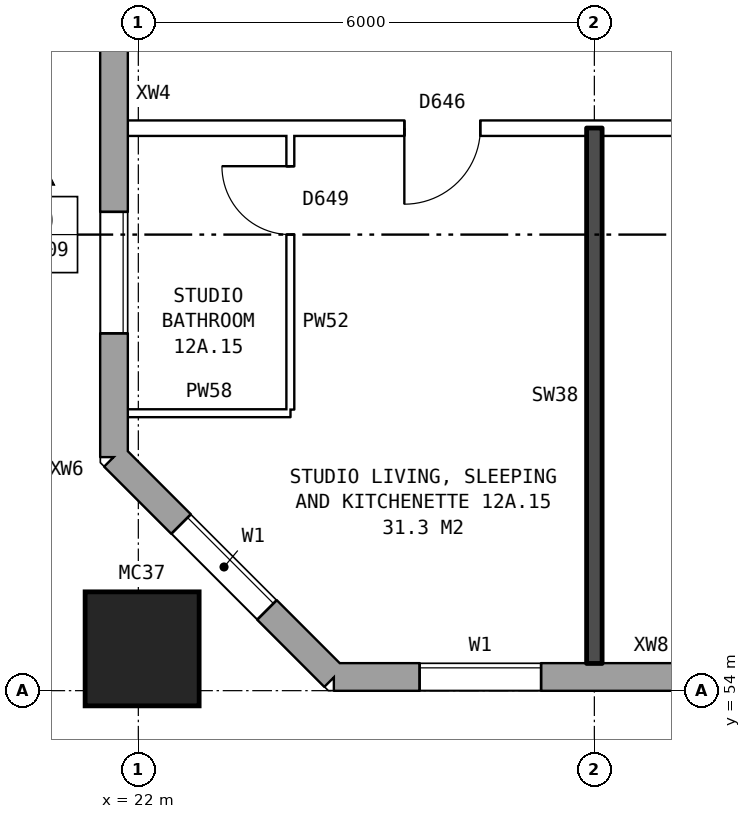
"""IFC4 building model, lengths in metres.
Left out: names, types, materials, properties, quantities, classifications, styles, units other than length and angle.
Written with IfcOpenShell. Run it as: python <this file> out.ifc"""

import sys

from ifc_helpers import new_model, si_unit, direction, frame, frame_2d, origin, origin_2d, place, context, subcontext, project, spatial, rectangle, hollow_rectangle, extrude, element, fill, save


model = new_model("IFC4")
c1 = context("Model", 3, precision=1e-05, world=origin(), true_north=direction((0.0, 1.0)))
c2 = subcontext(c1, "Body", "Model", "MODEL_VIEW")
j1 = project(units=[si_unit("LENGTHUNIT", "METRE"), si_unit("PLANEANGLEUNIT", "RADIAN")], contexts=[c1])
p1 = place(None, origin())
s1 = spatial("IfcSite", under=j1, at=p1, CompositionType="ELEMENT")
p2 = place(p1, origin())
s2 = spatial("IfcBuilding", under=s1, at=p2, CompositionType="ELEMENT")
p3 = place(p2, frame((0.0, 0.0, 47.4)))
s3 = spatial("IfcBuildingStorey", under=s2, at=p3, CompositionType="ELEMENT", Elevation=47.4)
p4 = place(p3, frame((22.05, 54.55, 0.0), z_axis=(0.0, 0.0, 1.0), x_axis=(1.0, 0.0, 0.0)))
e1 = element("IfcColumn", 1, at=p4, inside=s3, PredefinedType="COLUMN", context=c2, shape_type="SweptSolid", body=[
    extrude(hollow_rectangle(XDim=1.5, YDim=1.5, WallThickness=0.08, at=origin_2d()), origin(), (0.0, 0.0, 1.0), 3.1),
])
p5 = place(p3, frame((21.68, 57.075, 0.0), z_axis=(0.0, 0.0, 1.0), x_axis=(0.707106781187, -0.707106781187, 0.0)))
e2 = element("IfcWall", 2, at=p5, inside=s3, PredefinedType="STANDARD", context=c2, shape_type="SweptSolid", body=[
    extrude(rectangle(XDim=4.094, YDim=0.36, at=frame_2d((2.047, 0.0))), origin(), (0.0, 0.0, 1.0), 2.85),
])
p6 = place(p5, frame((1.247, 0.0, 0.8)))
e3 = element("IfcOpeningElement", 3, at=p6, cuts=e2, PredefinedType="OPENING", context=c2, shape_type="SweptSolid", body=[
    extrude(rectangle(XDim=1.6, YDim=1.8, at=frame_2d((0.8, 0.9))), frame((0.0, 0.19, 0.0), z_axis=(0.0, -1.0, 0.0), x_axis=(1.0, 0.0, 0.0)), (0.0, 0.0, 1.0), 0.38),
])
p7 = place(p3, frame((24.575, 54.18, 0.0), z_axis=(0.0, 0.0, 1.0), x_axis=(1.0, 0.0, 0.0)))
e4 = element("IfcWall", 4, at=p7, inside=s3, PredefinedType="STANDARD", context=c2, shape_type="SweptSolid", body=[
    extrude(rectangle(XDim=48.351, YDim=0.36, at=frame_2d((24.175, 0.0))), origin(), (0.0, 0.0, 1.0), 2.85),
])
p8 = place(p7, frame((1.125, 0.0, 0.8)))
e5 = element("IfcOpeningElement", 5, at=p8, cuts=e4, PredefinedType="OPENING", context=c2, shape_type="SweptSolid", body=[
    extrude(rectangle(XDim=1.6, YDim=1.8, at=frame_2d((0.8, 0.9))), frame((0.0, 0.19, 0.0), z_axis=(0.0, -1.0, 0.0), x_axis=(1.0, 0.0, 0.0)), (0.0, 0.0, 1.0), 0.38),
])
p9 = place(p7, frame((5.625, 0.0, 0.8)))
e6 = element("IfcOpeningElement", 6, at=p9, cuts=e4, PredefinedType="OPENING", context=c2, shape_type="SweptSolid", body=[
    extrude(rectangle(XDim=1.2, YDim=1.2, at=frame_2d((0.6, 0.6))), frame((0.0, 0.19, 0.0), z_axis=(0.0, -1.0, 0.0), x_axis=(1.0, 0.0, 0.0)), (0.0, 0.0, 1.0), 0.38),
])
p10 = place(p7, frame((7.125, 0.0, 0.8)))
e7 = element("IfcOpeningElement", 7, at=p10, cuts=e4, PredefinedType="OPENING", context=c2, shape_type="SweptSolid", body=[
    extrude(rectangle(XDim=1.6, YDim=1.8, at=frame_2d((0.8, 0.9))), frame((0.0, 0.19, 0.0), z_axis=(0.0, -1.0, 0.0), x_axis=(1.0, 0.0, 0.0)), (0.0, 0.0, 1.0), 0.38),
])
p11 = place(p7, frame((10.125, 0.0, 0.8)))
e8 = element("IfcOpeningElement", 8, at=p11, cuts=e4, PredefinedType="OPENING", context=c2, shape_type="SweptSolid", body=[
    extrude(rectangle(XDim=1.6, YDim=1.8, at=frame_2d((0.8, 0.9))), frame((0.0, 0.19, 0.0), z_axis=(0.0, -1.0, 0.0), x_axis=(1.0, 0.0, 0.0)), (0.0, 0.0, 1.0), 0.38),
])
p12 = place(p7, frame((13.125, 0.0, 0.8)))
e9 = element("IfcOpeningElement", 9, at=p12, cuts=e4, PredefinedType="OPENING", context=c2, shape_type="SweptSolid", body=[
    extrude(rectangle(XDim=1.6, YDim=1.8, at=frame_2d((0.8, 0.9))), frame((0.0, 0.19, 0.0), z_axis=(0.0, -1.0, 0.0), x_axis=(1.0, 0.0, 0.0)), (0.0, 0.0, 1.0), 0.38),
])
p13 = place(p7, frame((16.125, 0.0, 0.8)))
e10 = element("IfcOpeningElement", 10, at=p13, cuts=e4, PredefinedType="OPENING", context=c2, shape_type="SweptSolid", body=[
    extrude(rectangle(XDim=1.6, YDim=1.8, at=frame_2d((0.8, 0.9))), frame((0.0, 0.19, 0.0), z_axis=(0.0, -1.0, 0.0), x_axis=(1.0, 0.0, 0.0)), (0.0, 0.0, 1.0), 0.38),
])
p14 = place(p7, frame((19.125, 0.0, 0.8)))
e11 = element("IfcOpeningElement", 11, at=p14, cuts=e4, PredefinedType="OPENING", context=c2, shape_type="SweptSolid", body=[
    extrude(rectangle(XDim=1.6, YDim=1.8, at=frame_2d((0.8, 0.9))), frame((0.0, 0.19, 0.0), z_axis=(0.0, -1.0, 0.0), x_axis=(1.0, 0.0, 0.0)), (0.0, 0.0, 1.0), 0.38),
])
p15 = place(p7, frame((22.125, 0.0, 0.8)))
e12 = element("IfcOpeningElement", 12, at=p15, cuts=e4, PredefinedType="OPENING", context=c2, shape_type="SweptSolid", body=[
    extrude(rectangle(XDim=1.6, YDim=1.8, at=frame_2d((0.8, 0.9))), frame((0.0, 0.19, 0.0), z_axis=(0.0, -1.0, 0.0), x_axis=(1.0, 0.0, 0.0)), (0.0, 0.0, 1.0), 0.38),
])
p16 = place(p7, frame((25.125, 0.0, 0.8)))
e13 = element("IfcOpeningElement", 13, at=p16, cuts=e4, PredefinedType="OPENING", context=c2, shape_type="SweptSolid", body=[
    extrude(rectangle(XDim=1.6, YDim=1.8, at=frame_2d((0.8, 0.9))), frame((0.0, 0.19, 0.0), z_axis=(0.0, -1.0, 0.0), x_axis=(1.0, 0.0, 0.0)), (0.0, 0.0, 1.0), 0.38),
])
p17 = place(p7, frame((28.125, 0.0, 0.8)))
e14 = element("IfcOpeningElement", 14, at=p17, cuts=e4, PredefinedType="OPENING", context=c2, shape_type="SweptSolid", body=[
    extrude(rectangle(XDim=1.6, YDim=1.8, at=frame_2d((0.8, 0.9))), frame((0.0, 0.19, 0.0), z_axis=(0.0, -1.0, 0.0), x_axis=(1.0, 0.0, 0.0)), (0.0, 0.0, 1.0), 0.38),
])
p18 = place(p7, frame((31.125, 0.0, 0.8)))
e15 = element("IfcOpeningElement", 15, at=p18, cuts=e4, PredefinedType="OPENING", context=c2, shape_type="SweptSolid", body=[
    extrude(rectangle(XDim=1.6, YDim=1.8, at=frame_2d((0.8, 0.9))), frame((0.0, 0.19, 0.0), z_axis=(0.0, -1.0, 0.0), x_axis=(1.0, 0.0, 0.0)), (0.0, 0.0, 1.0), 0.38),
])
p19 = place(p7, frame((34.125, 0.0, 0.8)))
e16 = element("IfcOpeningElement", 16, at=p19, cuts=e4, PredefinedType="OPENING", context=c2, shape_type="SweptSolid", body=[
    extrude(rectangle(XDim=1.6, YDim=1.8, at=frame_2d((0.8, 0.9))), frame((0.0, 0.19, 0.0), z_axis=(0.0, -1.0, 0.0), x_axis=(1.0, 0.0, 0.0)), (0.0, 0.0, 1.0), 0.38),
])
p20 = place(p7, frame((37.125, 0.0, 0.8)))
e17 = element("IfcOpeningElement", 17, at=p20, cuts=e4, PredefinedType="OPENING", context=c2, shape_type="SweptSolid", body=[
    extrude(rectangle(XDim=1.6, YDim=1.8, at=frame_2d((0.8, 0.9))), frame((0.0, 0.19, 0.0), z_axis=(0.0, -1.0, 0.0), x_axis=(1.0, 0.0, 0.0)), (0.0, 0.0, 1.0), 0.38),
])
p21 = place(p7, frame((40.125, 0.0, 0.8)))
e18 = element("IfcOpeningElement", 18, at=p21, cuts=e4, PredefinedType="OPENING", context=c2, shape_type="SweptSolid", body=[
    extrude(rectangle(XDim=1.6, YDim=1.8, at=frame_2d((0.8, 0.9))), frame((0.0, 0.19, 0.0), z_axis=(0.0, -1.0, 0.0), x_axis=(1.0, 0.0, 0.0)), (0.0, 0.0, 1.0), 0.38),
])
p22 = place(p7, frame((42.025, 0.0, 0.8)))
e19 = element("IfcOpeningElement", 19, at=p22, cuts=e4, PredefinedType="OPENING", context=c2, shape_type="SweptSolid", body=[
    extrude(rectangle(XDim=1.0, YDim=0.9, at=frame_2d((0.5, 0.45))), frame((0.0, 0.19, 0.0), z_axis=(0.0, -1.0, 0.0), x_axis=(1.0, 0.0, 0.0)), (0.0, 0.0, 1.0), 0.38),
])
p23 = place(p7, frame((46.125, 0.0, 0.8)))
e20 = element("IfcOpeningElement", 20, at=p23, cuts=e4, PredefinedType="OPENING", context=c2, shape_type="SweptSolid", body=[
    extrude(rectangle(XDim=1.6, YDim=1.8, at=frame_2d((0.8, 0.9))), frame((0.0, 0.19, 0.0), z_axis=(0.0, -1.0, 0.0), x_axis=(1.0, 0.0, 0.0)), (0.0, 0.0, 1.0), 0.38),
])
p24 = place(p7, frame((44.525, 0.0, 1.7)))
e21 = element("IfcOpeningElement", 21, at=p24, cuts=e4, PredefinedType="OPENING", context=c2, shape_type="SweptSolid", body=[
    extrude(rectangle(XDim=0.6, YDim=0.9, at=frame_2d((0.3, 0.45))), frame((0.0, 0.19, 0.0), z_axis=(0.0, -1.0, 0.0), x_axis=(1.0, 0.0, 0.0)), (0.0, 0.0, 1.0), 0.38),
])
p25 = place(p3, frame((21.68, 82.925, 0.0), z_axis=(0.0, 0.0, 1.0), x_axis=(0.0, -1.0, 0.0)))
e22 = element("IfcWall", 22, at=p25, inside=s3, PredefinedType="STANDARD", context=c2, shape_type="SweptSolid", body=[
    extrude(rectangle(XDim=25.851, YDim=0.36, at=frame_2d((12.925, 0.0))), origin(), (0.0, 0.0, 1.0), 2.85),
])
p26 = place(p25, frame((1.625, 0.0, 0.8)))
e23 = element("IfcOpeningElement", 23, at=p26, cuts=e22, PredefinedType="OPENING", context=c2, shape_type="SweptSolid", body=[
    extrude(rectangle(XDim=1.6, YDim=1.8, at=frame_2d((0.8, 0.9))), frame((0.0, 0.19, 0.0), z_axis=(0.0, -1.0, 0.0), x_axis=(1.0, 0.0, 0.0)), (0.0, 0.0, 1.0), 0.38),
])
p27 = place(p25, frame((6.225, 0.0, 0.8)))
e24 = element("IfcOpeningElement", 24, at=p27, cuts=e22, PredefinedType="OPENING", context=c2, shape_type="SweptSolid", body=[
    extrude(rectangle(XDim=1.0, YDim=0.9, at=frame_2d((0.5, 0.45))), frame((0.0, 0.19, 0.0), z_axis=(0.0, -1.0, 0.0), x_axis=(1.0, 0.0, 0.0)), (0.0, 0.0, 1.0), 0.38),
])
p28 = place(p25, frame((7.625, 0.0, 0.8)))
e25 = element("IfcOpeningElement", 25, at=p28, cuts=e22, PredefinedType="OPENING", context=c2, shape_type="SweptSolid", body=[
    extrude(rectangle(XDim=1.6, YDim=1.8, at=frame_2d((0.8, 0.9))), frame((0.0, 0.19, 0.0), z_axis=(0.0, -1.0, 0.0), x_axis=(1.0, 0.0, 0.0)), (0.0, 0.0, 1.0), 0.38),
])
p29 = place(p25, frame((10.625, 0.0, 0.8)))
e26 = element("IfcOpeningElement", 26, at=p29, cuts=e22, PredefinedType="OPENING", context=c2, shape_type="SweptSolid", body=[
    extrude(rectangle(XDim=1.6, YDim=1.8, at=frame_2d((0.8, 0.9))), frame((0.0, 0.19, 0.0), z_axis=(0.0, -1.0, 0.0), x_axis=(1.0, 0.0, 0.0)), (0.0, 0.0, 1.0), 0.38),
])
p30 = place(p25, frame((13.625, 0.0, 0.8)))
e27 = element("IfcOpeningElement", 27, at=p30, cuts=e22, PredefinedType="OPENING", context=c2, shape_type="SweptSolid", body=[
    extrude(rectangle(XDim=1.6, YDim=1.8, at=frame_2d((0.8, 0.9))), frame((0.0, 0.19, 0.0), z_axis=(0.0, -1.0, 0.0), x_axis=(1.0, 0.0, 0.0)), (0.0, 0.0, 1.0), 0.38),
])
p31 = place(p25, frame((16.625, 0.0, 0.8)))
e28 = element("IfcOpeningElement", 28, at=p31, cuts=e22, PredefinedType="OPENING", context=c2, shape_type="SweptSolid", body=[
    extrude(rectangle(XDim=1.6, YDim=1.8, at=frame_2d((0.8, 0.9))), frame((0.0, 0.19, 0.0), z_axis=(0.0, -1.0, 0.0), x_axis=(1.0, 0.0, 0.0)), (0.0, 0.0, 1.0), 0.38),
])
p32 = place(p25, frame((9.525, 0.0, 0.8)))
e29 = element("IfcOpeningElement", 29, at=p32, cuts=e22, PredefinedType="OPENING", context=c2, shape_type="SweptSolid", body=[
    extrude(rectangle(XDim=0.8, YDim=1.8, at=frame_2d((0.4, 0.9))), frame((0.0, 0.19, 0.0), z_axis=(0.0, -1.0, 0.0), x_axis=(1.0, 0.0, 0.0)), (0.0, 0.0, 1.0), 0.38),
])
p33 = place(p25, frame((22.625, 0.0, 0.8)))
e30 = element("IfcOpeningElement", 30, at=p33, cuts=e22, PredefinedType="OPENING", context=c2, shape_type="SweptSolid", body=[
    extrude(rectangle(XDim=1.6, YDim=1.8, at=frame_2d((0.8, 0.9))), frame((0.0, 0.19, 0.0), z_axis=(0.0, -1.0, 0.0), x_axis=(1.0, 0.0, 0.0)), (0.0, 0.0, 1.0), 0.38),
])
p34 = place(p25, frame((12.525, 0.0, 0.8)))
e31 = element("IfcOpeningElement", 31, at=p34, cuts=e22, PredefinedType="OPENING", context=c2, shape_type="SweptSolid", body=[
    extrude(rectangle(XDim=0.8, YDim=1.8, at=frame_2d((0.4, 0.9))), frame((0.0, 0.19, 0.0), z_axis=(0.0, -1.0, 0.0), x_axis=(1.0, 0.0, 0.0)), (0.0, 0.0, 1.0), 0.38),
])
p35 = place(p25, frame((15.525, 0.0, 0.8)))
e32 = element("IfcOpeningElement", 32, at=p35, cuts=e22, PredefinedType="OPENING", context=c2, shape_type="SweptSolid", body=[
    extrude(rectangle(XDim=0.8, YDim=1.8, at=frame_2d((0.4, 0.9))), frame((0.0, 0.19, 0.0), z_axis=(0.0, -1.0, 0.0), x_axis=(1.0, 0.0, 0.0)), (0.0, 0.0, 1.0), 0.38),
])
p36 = place(p25, frame((18.525, 0.0, 0.8)))
e33 = element("IfcOpeningElement", 33, at=p36, cuts=e22, PredefinedType="OPENING", context=c2, shape_type="SweptSolid", body=[
    extrude(rectangle(XDim=1.0, YDim=0.9, at=frame_2d((0.5, 0.45))), frame((0.0, 0.19, 0.0), z_axis=(0.0, -1.0, 0.0), x_axis=(1.0, 0.0, 0.0)), (0.0, 0.0, 1.0), 0.38),
])
p37 = place(p3, frame((21.86, 57.65, 0.0), z_axis=(0.0, 0.0, 1.0), x_axis=(1.0, 0.0, 0.0)))
e34 = element("IfcWall", 34, at=p37, inside=s3, PredefinedType="PARTITIONING", context=c2, shape_type="SweptSolid", body=[
    extrude(rectangle(XDim=2.14, YDim=0.1, at=frame_2d((1.07, 0.0))), origin(), (0.0, 0.0, 1.0), 2.85),
])
p38 = place(p3, frame((21.86, 61.4, 0.0), z_axis=(0.0, 0.0, 1.0), x_axis=(1.0, 0.0, 0.0)))
e35 = element("IfcWall", 35, at=p38, inside=s3, PredefinedType="PARTITIONING", context=c2, shape_type="SweptSolid", body=[
    extrude(rectangle(XDim=24.04, YDim=0.2, at=frame_2d((12.02, 0.0))), origin(), (0.0, 0.0, 1.0), 2.85),
])
p39 = place(p38, frame((20.59, 0.0, 0.0)))
e36 = element("IfcOpeningElement", 36, at=p39, cuts=e35, PredefinedType="OPENING", context=c2, shape_type="SweptSolid", body=[
    extrude(rectangle(XDim=1.0, YDim=2.1, at=frame_2d((0.5, 1.05))), frame((0.0, 0.11, 0.0), z_axis=(0.0, -1.0, 0.0), x_axis=(1.0, 0.0, 0.0)), (0.0, 0.0, 1.0), 0.22),
])
p40 = place(p38, frame((8.64, 0.0, 0.0)))
e37 = element("IfcOpeningElement", 37, at=p40, cuts=e35, PredefinedType="OPENING", context=c2, shape_type="SweptSolid", body=[
    extrude(rectangle(XDim=1.0, YDim=2.1, at=frame_2d((0.5, 1.05))), frame((0.0, 0.11, 0.0), z_axis=(0.0, -1.0, 0.0), x_axis=(1.0, 0.0, 0.0)), (0.0, 0.0, 1.0), 0.22),
])
p41 = place(p38, frame((3.64, 0.0, 0.0)))
e38 = element("IfcOpeningElement", 38, at=p41, cuts=e35, PredefinedType="OPENING", context=c2, shape_type="SweptSolid", body=[
    extrude(rectangle(XDim=1.0, YDim=2.1, at=frame_2d((0.5, 1.05))), frame((0.0, 0.11, 0.0), z_axis=(0.0, -1.0, 0.0), x_axis=(1.0, 0.0, 0.0)), (0.0, 0.0, 1.0), 0.22),
])
p42 = place(p3, frame((24.0, 57.7, 0.0), z_axis=(0.0, 0.0, 1.0), x_axis=(0.0, 1.0, 0.0)))
e39 = element("IfcWall", 39, at=p42, inside=s3, PredefinedType="PARTITIONING", context=c2, shape_type="SweptSolid", body=[
    extrude(rectangle(XDim=3.6, YDim=0.1, at=frame_2d((1.8, 0.0))), origin(), (0.0, 0.0, 1.0), 2.85),
])
p43 = place(p42, frame((2.3, 0.0, 0.0)))
e40 = element("IfcOpeningElement", 40, at=p43, cuts=e39, PredefinedType="OPENING", context=c2, shape_type="SweptSolid", body=[
    extrude(rectangle(XDim=0.9, YDim=2.1, at=frame_2d((0.45, 1.05))), frame((0.0, 0.06, 0.0), z_axis=(0.0, -1.0, 0.0), x_axis=(1.0, 0.0, 0.0)), (0.0, 0.0, 1.0), 0.12),
])
p44 = place(p3, frame((28.0, 54.36, 0.0), z_axis=(0.0, 0.0, 1.0), x_axis=(0.0, 1.0, 0.0)))
e41 = element("IfcWall", 41, at=p44, inside=s3, PredefinedType="SOLIDWALL", context=c2, shape_type="SweptSolid", body=[
    extrude(rectangle(XDim=7.04, YDim=0.2, at=frame_2d((3.52, 0.0))), origin(), (0.0, 0.0, 1.0), 2.85),
])
p45 = place(p6, origin())
e42 = element("IfcWindow", 42, at=p45, inside=s3, PartitioningType="SINGLE_PANEL", PredefinedType="WINDOW", context=c2, shape_type="SweptSolid", body=[
    extrude(rectangle(XDim=1.6, YDim=1.8, at=frame_2d((0.8, 0.9))), frame((0.0, 0.15, 0.0), z_axis=(0.0, -1.0, 0.0), x_axis=(1.0, 0.0, 0.0)), (0.0, 0.0, 1.0), 0.06),
])
fill(e3, e42)
p46 = place(p8, origin())
e43 = element("IfcWindow", 43, at=p46, inside=s3, PartitioningType="SINGLE_PANEL", PredefinedType="WINDOW", context=c2, shape_type="SweptSolid", body=[
    extrude(rectangle(XDim=1.6, YDim=1.8, at=frame_2d((0.8, 0.9))), frame((0.0, 0.15, 0.0), z_axis=(0.0, -1.0, 0.0), x_axis=(1.0, 0.0, 0.0)), (0.0, 0.0, 1.0), 0.06),
])
fill(e5, e43)
p47 = place(p33, origin())
e44 = element("IfcWindow", 44, at=p47, inside=s3, PartitioningType="SINGLE_PANEL", PredefinedType="WINDOW", context=c2, shape_type="SweptSolid", body=[
    extrude(rectangle(XDim=1.6, YDim=1.8, at=frame_2d((0.8, 0.9))), frame((0.0, 0.15, 0.0), z_axis=(0.0, -1.0, 0.0), x_axis=(1.0, 0.0, 0.0)), (0.0, 0.0, 1.0), 0.06),
])
fill(e30, e44)
p48 = place(p41, frame((1.0, 0.0, 0.0), z_axis=(0.0, 0.0, 1.0), x_axis=(-1.0, 0.0, 0.0)))
e45 = element("IfcDoor", 45, at=p48, inside=s3, OperationType="SINGLE_SWING_RIGHT", PredefinedType="DOOR", context=c2, shape_type="SweptSolid", body=[
    extrude(rectangle(XDim=1.0, YDim=2.1, at=frame_2d((0.5, 1.05))), frame((0.0, 0.025, 0.0), z_axis=(0.0, -1.0, 0.0), x_axis=(1.0, 0.0, 0.0)), (0.0, 0.0, 1.0), 0.05),
])
fill(e38, e45)
p49 = place(p43, origin())
e46 = element("IfcDoor", 46, at=p49, inside=s3, OperationType="SINGLE_SWING_RIGHT", PredefinedType="DOOR", context=c2, shape_type="SweptSolid", body=[
    extrude(rectangle(XDim=0.9, YDim=2.1, at=frame_2d((0.45, 1.05))), frame((0.0, 0.025, 0.0), z_axis=(0.0, -1.0, 0.0), x_axis=(1.0, 0.0, 0.0)), (0.0, 0.0, 1.0), 0.05),
])
fill(e40, e46)
save(model, sys.argv[1])
